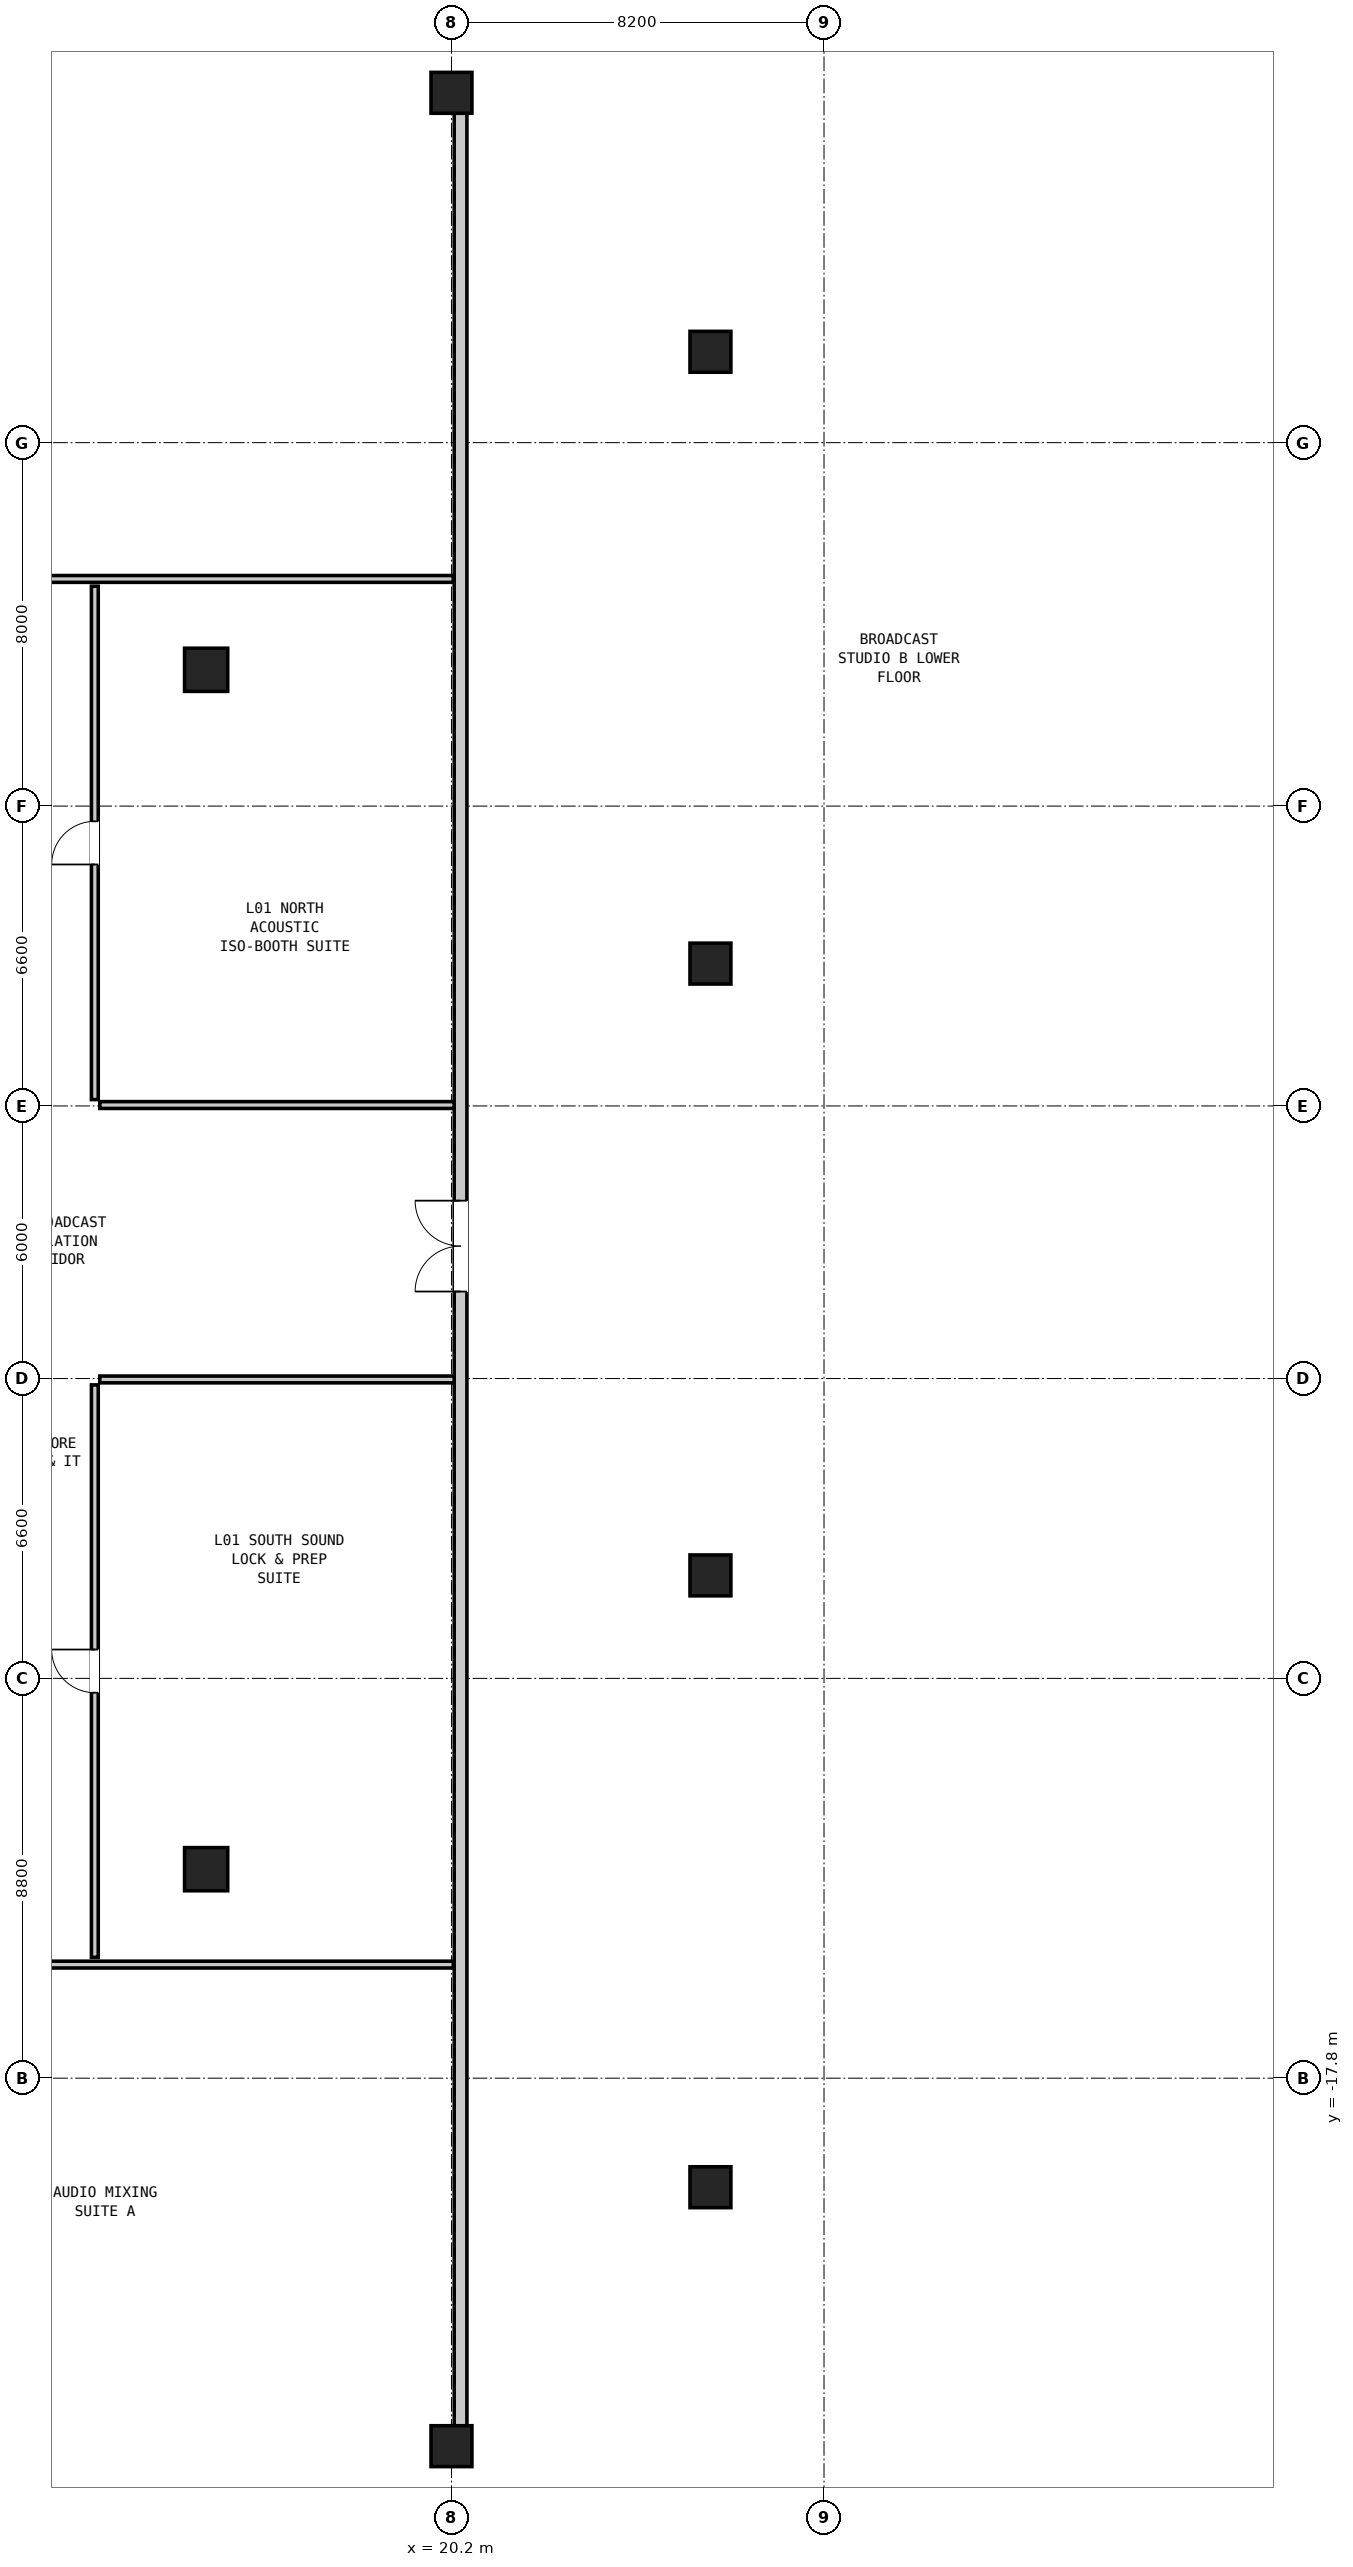
"""IFC4 building model, lengths in metres.
Left out: names, types, materials, properties, quantities, classifications, styles, units other than length and angle.
Written with IfcOpenShell. Run it as: python <this file> out.ifc"""

import sys

from ifc_helpers import new_model, si_unit, direction, frame, frame_2d, origin, origin_2d, place, context, subcontext, project, spatial, rectangle, hollow_rectangle, extrude, element, fill, save


model = new_model("IFC4")
c1 = context("Model", 3, precision=1e-05, world=origin(), true_north=direction((0.0, 1.0)))
c2 = subcontext(c1, "Body", "Model", "MODEL_VIEW")
j1 = project(units=[si_unit("LENGTHUNIT", "METRE"), si_unit("PLANEANGLEUNIT", "RADIAN")], contexts=[c1])
p1 = place(None, origin())
s1 = spatial("IfcSite", under=j1, at=p1, CompositionType="ELEMENT")
p2 = place(p1, origin())
s2 = spatial("IfcBuilding", under=s1, at=p2, CompositionType="ELEMENT")
p3 = place(p2, frame((0.0, 0.0, 5.1)))
s3 = spatial("IfcBuildingStorey", under=s2, at=p3, CompositionType="ELEMENT", Elevation=5.1)
for number, where, z_axis, x_axis in (
    (1, (14.8, -13.2, 0.0), (0.0, 0.0, 1.0), (1.0, 0.0, 0.0)),
    (2, (14.8, 13.2, 0.0), (0.0, 0.0, 1.0), (1.0, 0.0, 0.0)),
):
    element("IfcColumn", number, at=place(p3, frame(where, z_axis=z_axis, x_axis=x_axis)), inside=s3, PredefinedType="COLUMN", context=c2, shape_type="SweptSolid", body=[
        extrude(hollow_rectangle(XDim=0.95, YDim=0.95, WallThickness=0.06, at=origin_2d()), origin(), (0.0, 0.0, 1.0), 4.2),
    ])
for number, where, z_axis, x_axis in (
    (3, (20.2, -25.9, 0.0), (0.0, 0.0, 1.0), (1.0, 0.0, 0.0)),
    (4, (25.9, -20.2, 0.0), (0.0, 0.0, 1.0), (0.0, 1.0, 0.0)),
    (5, (25.9, -6.733, 0.0), (0.0, 0.0, 1.0), (0.0, 1.0, 0.0)),
    (6, (25.9, 6.733, 0.0), (0.0, 0.0, 1.0), (0.0, 1.0, 0.0)),
    (7, (25.9, 20.2, 0.0), (0.0, 0.0, 1.0), (0.0, 1.0, 0.0)),
    (8, (20.2, 25.9, 0.0), (0.0, 0.0, 1.0), (1.0, 0.0, 0.0)),
):
    element("IfcColumn", number, at=place(p3, frame(where, z_axis=z_axis, x_axis=x_axis)), inside=s3, PredefinedType="COLUMN", context=c2, shape_type="SweptSolid", body=[
        extrude(hollow_rectangle(XDim=0.9, YDim=0.9, WallThickness=0.055, at=origin_2d()), origin(), (0.0, 0.0, 1.0), 4.2),
    ])
p4 = place(p3, frame((20.4, -25.74, 0.0), z_axis=(0.0, 0.0, 1.0), x_axis=(0.0, 1.0, 0.0)))
e9 = element("IfcWall", 9, at=p4, inside=s3, PredefinedType="MOVABLE", context=c2, shape_type="SweptSolid", body=[
    extrude(rectangle(XDim=51.48, YDim=0.28, at=frame_2d((25.74, 0.0))), origin(), (0.0, 0.0, 1.0), 2.933),
])
p5 = place(p4, frame((25.255, 0.0, 0.0)))
e10 = element("IfcOpeningElement", 10, at=p5, cuts=e9, PredefinedType="OPENING", context=c2, shape_type="SweptSolid", body=[
    extrude(rectangle(XDim=2.0, YDim=2.14, at=frame_2d((1.0, 1.07))), frame((0.0, 0.152, 0.0), z_axis=(0.0, -1.0, 0.0), x_axis=(1.0, 0.0, 0.0)), (0.0, 0.0, 1.0), 0.304),
])
p6 = place(p3, frame((-3.34, 15.2, 0.0), z_axis=(0.0, 0.0, 1.0), x_axis=(1.0, 0.0, 0.0)))
e11 = element("IfcWall", 11, at=p6, inside=s3, PredefinedType="PARTITIONING", context=c2, shape_type="SweptSolid", body=[
    extrude(rectangle(XDim=23.58, YDim=0.15, at=frame_2d((11.79, 0.0))), origin(), (0.0, 0.0, 1.0), 3.88),
])
p7 = place(p6, frame((5.295, 0.0, 0.0)))
e12 = element("IfcOpeningElement", 12, at=p7, cuts=e11, PredefinedType="OPENING", context=c2, shape_type="SweptSolid", body=[
    extrude(rectangle(XDim=1.2, YDim=2.1, at=frame_2d((0.6, 1.05))), frame((0.0, 0.087, 0.0), z_axis=(0.0, -1.0, 0.0), x_axis=(1.0, 0.0, 0.0)), (0.0, 0.0, 1.0), 0.174),
])
p8 = place(p3, frame((-3.34, -15.3, 0.0), z_axis=(0.0, 0.0, 1.0), x_axis=(1.0, 0.0, 0.0)))
e13 = element("IfcWall", 13, at=p8, inside=s3, PredefinedType="PARTITIONING", context=c2, shape_type="SweptSolid", body=[
    extrude(rectangle(XDim=23.58, YDim=0.15, at=frame_2d((11.79, 0.0))), origin(), (0.0, 0.0, 1.0), 3.88),
])
p9 = place(p8, frame((5.295, 0.0, 0.0)))
e14 = element("IfcOpeningElement", 14, at=p9, cuts=e13, PredefinedType="OPENING", context=c2, shape_type="SweptSolid", body=[
    extrude(rectangle(XDim=1.2, YDim=2.1, at=frame_2d((0.6, 1.05))), frame((0.0, 0.087, 0.0), z_axis=(0.0, -1.0, 0.0), x_axis=(1.0, 0.0, 0.0)), (0.0, 0.0, 1.0), 0.174),
])
p10 = place(p3, frame((12.35, -15.14, 0.0), z_axis=(0.0, 0.0, 1.0), x_axis=(0.0, 1.0, 0.0)))
e15 = element("IfcWall", 15, at=p10, inside=s3, PredefinedType="PARTITIONING", context=c2, shape_type="SweptSolid", body=[
    extrude(rectangle(XDim=12.6, YDim=0.15, at=frame_2d((6.3, 0.0))), origin(), (0.0, 0.0, 1.0), 3.88),
])
p11 = place(p10, frame((5.825, 0.0, 0.0)))
e16 = element("IfcOpeningElement", 16, at=p11, cuts=e15, PredefinedType="OPENING", context=c2, shape_type="SweptSolid", body=[
    extrude(rectangle(XDim=0.95, YDim=2.1, at=frame_2d((0.475, 1.05))), frame((0.0, 0.087, 0.0), z_axis=(0.0, -1.0, 0.0), x_axis=(1.0, 0.0, 0.0)), (0.0, 0.0, 1.0), 0.174),
])
p12 = place(p3, frame((12.35, 3.74, 0.0), z_axis=(0.0, 0.0, 1.0), x_axis=(0.0, 1.0, 0.0)))
e17 = element("IfcWall", 17, at=p12, inside=s3, PredefinedType="PARTITIONING", context=c2, shape_type="SweptSolid", body=[
    extrude(rectangle(XDim=11.3, YDim=0.15, at=frame_2d((5.65, 0.0))), origin(), (0.0, 0.0, 1.0), 3.88),
])
p13 = place(p12, frame((5.175, 0.0, 0.0)))
e18 = element("IfcOpeningElement", 18, at=p13, cuts=e17, PredefinedType="OPENING", context=c2, shape_type="SweptSolid", body=[
    extrude(rectangle(XDim=0.95, YDim=2.1, at=frame_2d((0.475, 1.05))), frame((0.0, 0.087, 0.0), z_axis=(0.0, -1.0, 0.0), x_axis=(1.0, 0.0, 0.0)), (0.0, 0.0, 1.0), 0.174),
])
for number, where, z_axis, x_axis in (
    (19, (12.46, -2.42, 0.0), (0.0, 0.0, 1.0), (1.0, 0.0, 0.0)),
    (20, (12.46, 3.62, 0.0), (0.0, 0.0, 1.0), (1.0, 0.0, 0.0)),
):
    element("IfcWall", number, at=place(p3, frame(where, z_axis=z_axis, x_axis=x_axis)), inside=s3, PredefinedType="PARTITIONING", context=c2, shape_type="SweptSolid", body=[
        extrude(rectangle(XDim=7.8, YDim=0.15, at=frame_2d((3.9, 0.0))), origin(), (0.0, 0.0, 1.0), 2.742),
    ])
p14 = place(p5, origin())
e21 = element("IfcDoor", 21, at=p14, inside=s3, OperationType="DOUBLE_DOOR_SINGLE_SWING", PredefinedType="DOOR", context=c2, shape_type="SweptSolid", body=[
    extrude(rectangle(XDim=2.0, YDim=2.14, at=frame_2d((1.0, 1.07))), frame((0.0, 0.025, 0.0), z_axis=(0.0, -1.0, 0.0), x_axis=(1.0, 0.0, 0.0)), (0.0, 0.0, 1.0), 0.05),
])
fill(e10, e21)
p15 = place(p11, origin())
e22 = element("IfcDoor", 22, at=p15, inside=s3, OperationType="SINGLE_SWING_RIGHT", PredefinedType="DOOR", context=c2, shape_type="SweptSolid", body=[
    extrude(rectangle(XDim=0.95, YDim=2.1, at=frame_2d((0.475, 1.05))), frame((0.0, 0.025, 0.0), z_axis=(0.0, -1.0, 0.0), x_axis=(1.0, 0.0, 0.0)), (0.0, 0.0, 1.0), 0.05),
])
fill(e16, e22)
p16 = place(p13, origin())
e23 = element("IfcDoor", 23, at=p16, inside=s3, OperationType="SINGLE_SWING_LEFT", PredefinedType="DOOR", context=c2, shape_type="SweptSolid", body=[
    extrude(rectangle(XDim=0.95, YDim=2.1, at=frame_2d((0.475, 1.05))), frame((0.0, 0.025, 0.0), z_axis=(0.0, -1.0, 0.0), x_axis=(1.0, 0.0, 0.0)), (0.0, 0.0, 1.0), 0.05),
])
fill(e18, e23)
save(model, sys.argv[1])
